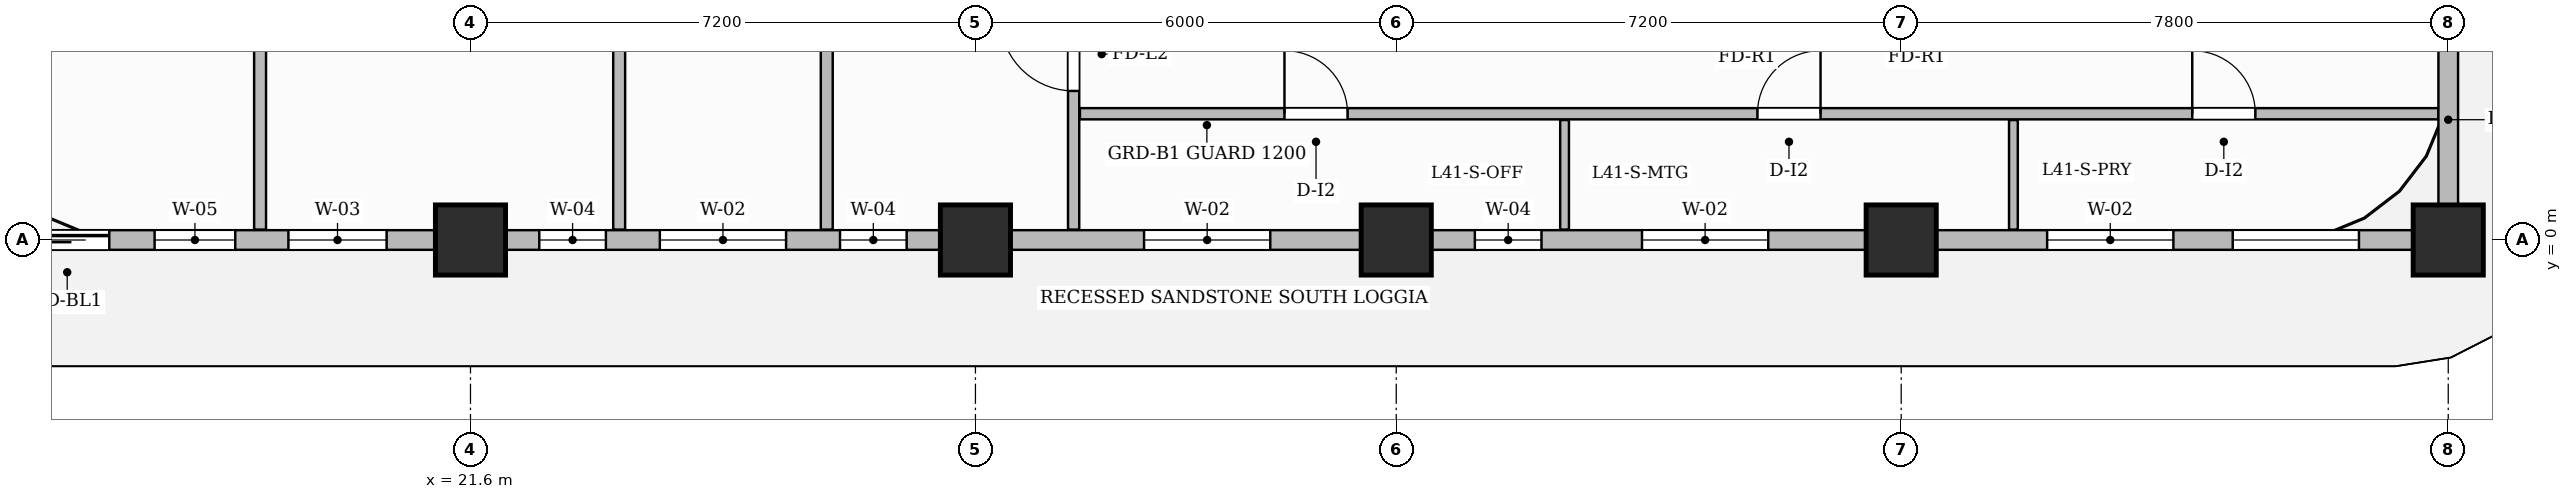
"""IFC4 building model, lengths in metres.
Left out: names, types, materials, properties, quantities, classifications, styles, units other than length and angle.
Written with IfcOpenShell. Run it as: python <this file> out.ifc"""

import sys

from ifc_helpers import new_model, si_unit, direction, frame, frame_2d, origin, origin_2d, place, context, subcontext, project, spatial, rectangle, extrude, source, transform, mapped, element, fill, save


model = new_model("IFC4")
c1 = context("Model", 3, precision=1e-05, world=origin(), true_north=direction((0.0, 1.0)))
c2 = subcontext(c1, "Body", "Model", "MODEL_VIEW")
j1 = project(units=[si_unit("LENGTHUNIT", "METRE"), si_unit("PLANEANGLEUNIT", "RADIAN")], contexts=[c1])
p1 = place(None, origin())
s1 = spatial("IfcSite", under=j1, at=p1, CompositionType="ELEMENT")
p2 = place(p1, origin())
s2 = spatial("IfcBuilding", under=s1, at=p2, CompositionType="ELEMENT")
p3 = place(p2, frame((0.0, 0.0, 165.7)))
s3 = spatial("IfcBuildingStorey", under=s2, at=p3, CompositionType="ELEMENT", Elevation=165.7)
m1 = source(origin(), c2, "Body", "SweptSolid", [
    extrude(rectangle(XDim=1.0, YDim=1.0, at=origin_2d()), origin(), (0.0, 0.0, 1.0), 3.85),
])
for number, where, z_axis, x_axis in (
    (1, (21.6, 0.0, 0.0), (0.0, 0.0, 1.0), (1.0, 0.0, 0.0)),
    (2, (28.8, 0.0, 0.0), (0.0, 0.0, 1.0), (1.0, 0.0, 0.0)),
    (3, (34.8, 0.0, 0.0), (0.0, 0.0, 1.0), (1.0, 0.0, 0.0)),
    (4, (42.0, 0.0, 0.0), (0.0, 0.0, 1.0), (1.0, 0.0, 0.0)),
    (5, (49.8, 0.0, 0.0), (0.0, 0.0, 1.0), (1.0, 0.0, 0.0)),
):
    element("IfcColumn", number, at=place(p3, frame(where, z_axis=z_axis, x_axis=x_axis)), inside=s3, PredefinedType="COLUMN", context=c2, shape_type="MappedRepresentation", body=[
        mapped(m1, transform((0.0, 0.0, 0.0), scale=1.0)),
    ])
p4 = place(p3, frame((30.2, 0.148, 0.0), z_axis=(0.0, 0.0, 1.0), x_axis=(0.0, 1.0, 0.0)))
e6 = element("IfcWall", 6, at=p4, inside=s3, PredefinedType="PARTITIONING", context=c2, shape_type="SweptSolid", body=[
    extrude(rectangle(XDim=8.912, YDim=0.16, at=frame_2d((4.456, 0.0))), origin(), (0.0, 0.0, 1.0), 3.6),
])
p5 = place(p4, frame((1.977, 0.0, 0.0)))
e7 = element("IfcOpeningElement", 7, at=p5, cuts=e6, PredefinedType="OPENING", context=c2, shape_type="SweptSolid", body=[
    extrude(rectangle(XDim=1.05, YDim=2.15, at=frame_2d((0.525, 1.075))), frame((0.0, 0.09, 0.0), z_axis=(0.0, -1.0, 0.0), x_axis=(1.0, 0.0, 0.0)), (0.0, 0.0, 1.0), 0.18),
])
p6 = place(p3, frame((30.29, 1.8, 0.0), z_axis=(0.0, 0.0, 1.0), x_axis=(1.0, 0.0, 0.0)))
e8 = element("IfcWall", 8, at=p6, inside=s3, PredefinedType="PARTITIONING", context=c2, shape_type="SweptSolid", body=[
    extrude(rectangle(XDim=19.37, YDim=0.16, at=frame_2d((9.685, 0.0))), origin(), (0.0, 0.0, 1.0), 3.6),
])
p7 = place(p6, frame((2.916, 0.0, 0.0)))
e9 = element("IfcOpeningElement", 9, at=p7, cuts=e8, PredefinedType="OPENING", context=c2, shape_type="SweptSolid", body=[
    extrude(rectangle(XDim=0.9, YDim=2.15, at=frame_2d((0.45, 1.075))), frame((0.0, 0.09, 0.0), z_axis=(0.0, -1.0, 0.0), x_axis=(1.0, 0.0, 0.0)), (0.0, 0.0, 1.0), 0.18),
])
p8 = place(p6, frame((9.66, 0.0, 0.0)))
e10 = element("IfcOpeningElement", 10, at=p8, cuts=e8, PredefinedType="OPENING", context=c2, shape_type="SweptSolid", body=[
    extrude(rectangle(XDim=0.9, YDim=2.15, at=frame_2d((0.45, 1.075))), frame((0.0, 0.09, 0.0), z_axis=(0.0, -1.0, 0.0), x_axis=(1.0, 0.0, 0.0)), (0.0, 0.0, 1.0), 0.18),
])
p9 = place(p6, frame((15.86, 0.0, 0.0)))
e11 = element("IfcOpeningElement", 11, at=p9, cuts=e8, PredefinedType="OPENING", context=c2, shape_type="SweptSolid", body=[
    extrude(rectangle(XDim=0.9, YDim=2.15, at=frame_2d((0.45, 1.075))), frame((0.0, 0.09, 0.0), z_axis=(0.0, -1.0, 0.0), x_axis=(1.0, 0.0, 0.0)), (0.0, 0.0, 1.0), 0.18),
])
for number, where, z_axis, x_axis in (
    (12, (37.2, 0.148, 0.0), (0.0, 0.0, 1.0), (0.0, 1.0, 0.0)),
    (13, (43.6, 0.148, 0.0), (0.0, 0.0, 1.0), (0.0, 1.0, 0.0)),
):
    element("IfcWall", number, at=place(p3, frame(where, z_axis=z_axis, x_axis=x_axis)), inside=s3, PredefinedType="PARTITIONING", context=c2, shape_type="SweptSolid", body=[
        extrude(rectangle(XDim=1.562, YDim=0.125, at=frame_2d((0.781, 0.0))), origin(), (0.0, 0.0, 1.0), 3.6),
    ])
for number, where, z_axis, x_axis in (
    (14, (18.6, 0.148, 0.0), (0.0, 0.0, 1.0), (0.0, 1.0, 0.0)),
    (15, (23.72, 0.148, 0.0), (0.0, 0.0, 1.0), (0.0, 1.0, 0.0)),
    (16, (26.68, 0.148, 0.0), (0.0, 0.0, 1.0), (0.0, 1.0, 0.0)),
):
    element("IfcWall", number, at=place(p3, frame(where, z_axis=z_axis, x_axis=x_axis)), inside=s3, PredefinedType="PARTITIONING", context=c2, shape_type="SweptSolid", body=[
        extrude(rectangle(XDim=8.912, YDim=0.17, at=frame_2d((4.456, 0.0))), origin(), (0.0, 0.0, 1.0), 3.6),
    ])
p10 = place(p3, frame((14.4, 0.0, 0.0), z_axis=(0.0, 0.0, 1.0), x_axis=(1.0, 0.0, 0.0)))
e17 = element("IfcWall", 17, at=p10, inside=s3, PredefinedType="SOLIDWALL", context=c2, shape_type="SweptSolid", body=[
    extrude(rectangle(XDim=35.4, YDim=0.28, at=frame_2d((17.7, 0.0))), origin(), (0.0, 0.0, 1.0), 3.085),
])
p11 = place(p10, frame((0.85, 0.0, 0.0)))
e18 = element("IfcOpeningElement", 18, at=p11, cuts=e17, PredefinedType="OPENING", context=c2, shape_type="SweptSolid", body=[
    extrude(rectangle(XDim=1.2, YDim=2.2, at=frame_2d((0.6, 1.1))), frame((0.0, 0.15, 0.0), z_axis=(0.0, -1.0, 0.0), x_axis=(1.0, 0.0, 0.0)), (0.0, 0.0, 1.0), 0.3),
])
p12 = place(p10, frame((2.696, 0.0, 0.8)))
e19 = element("IfcOpeningElement", 19, at=p12, cuts=e17, PredefinedType="OPENING", context=c2, shape_type="SweptSolid", body=[
    extrude(rectangle(XDim=1.15, YDim=1.8, at=frame_2d((0.575, 0.9))), frame((0.0, 0.15, 0.0), z_axis=(0.0, -1.0, 0.0), x_axis=(1.0, 0.0, 0.0)), (0.0, 0.0, 1.0), 0.3),
])
p13 = place(p10, frame((4.604, 0.0, 0.8)))
e20 = element("IfcOpeningElement", 20, at=p13, cuts=e17, PredefinedType="OPENING", context=c2, shape_type="SweptSolid", body=[
    extrude(rectangle(XDim=1.4, YDim=1.85, at=frame_2d((0.7, 0.925))), frame((0.0, 0.15, 0.0), z_axis=(0.0, -1.0, 0.0), x_axis=(1.0, 0.0, 0.0)), (0.0, 0.0, 1.0), 0.3),
])
p14 = place(p10, frame((8.181, 0.0, 0.8)))
e21 = element("IfcOpeningElement", 21, at=p14, cuts=e17, PredefinedType="OPENING", context=c2, shape_type="SweptSolid", body=[
    extrude(rectangle(XDim=0.95, YDim=1.75, at=frame_2d((0.475, 0.875))), frame((0.0, 0.15, 0.0), z_axis=(0.0, -1.0, 0.0), x_axis=(1.0, 0.0, 0.0)), (0.0, 0.0, 1.0), 0.3),
])
p15 = place(p10, frame((9.9, 0.0, 0.8)))
e22 = element("IfcOpeningElement", 22, at=p15, cuts=e17, PredefinedType="OPENING", context=c2, shape_type="SweptSolid", body=[
    extrude(rectangle(XDim=1.8, YDim=1.85, at=frame_2d((0.9, 0.925))), frame((0.0, 0.15, 0.0), z_axis=(0.0, -1.0, 0.0), x_axis=(1.0, 0.0, 0.0)), (0.0, 0.0, 1.0), 0.3),
])
p16 = place(p10, frame((12.469, 0.0, 0.8)))
e23 = element("IfcOpeningElement", 23, at=p16, cuts=e17, PredefinedType="OPENING", context=c2, shape_type="SweptSolid", body=[
    extrude(rectangle(XDim=0.95, YDim=1.75, at=frame_2d((0.475, 0.875))), frame((0.0, 0.15, 0.0), z_axis=(0.0, -1.0, 0.0), x_axis=(1.0, 0.0, 0.0)), (0.0, 0.0, 1.0), 0.3),
])
p17 = place(p10, frame((16.804, 0.0, 0.8)))
e24 = element("IfcOpeningElement", 24, at=p17, cuts=e17, PredefinedType="OPENING", context=c2, shape_type="SweptSolid", body=[
    extrude(rectangle(XDim=1.8, YDim=1.85, at=frame_2d((0.9, 0.925))), frame((0.0, 0.15, 0.0), z_axis=(0.0, -1.0, 0.0), x_axis=(1.0, 0.0, 0.0)), (0.0, 0.0, 1.0), 0.3),
])
p18 = place(p10, frame((21.521, 0.0, 0.8)))
e25 = element("IfcOpeningElement", 25, at=p18, cuts=e17, PredefinedType="OPENING", context=c2, shape_type="SweptSolid", body=[
    extrude(rectangle(XDim=0.95, YDim=1.75, at=frame_2d((0.475, 0.875))), frame((0.0, 0.15, 0.0), z_axis=(0.0, -1.0, 0.0), x_axis=(1.0, 0.0, 0.0)), (0.0, 0.0, 1.0), 0.3),
])
p19 = place(p10, frame((23.904, 0.0, 0.8)))
e26 = element("IfcOpeningElement", 26, at=p19, cuts=e17, PredefinedType="OPENING", context=c2, shape_type="SweptSolid", body=[
    extrude(rectangle(XDim=1.8, YDim=1.85, at=frame_2d((0.9, 0.925))), frame((0.0, 0.15, 0.0), z_axis=(0.0, -1.0, 0.0), x_axis=(1.0, 0.0, 0.0)), (0.0, 0.0, 1.0), 0.3),
])
p20 = place(p10, frame((29.681, 0.0, 0.8)))
e27 = element("IfcOpeningElement", 27, at=p20, cuts=e17, PredefinedType="OPENING", context=c2, shape_type="SweptSolid", body=[
    extrude(rectangle(XDim=1.8, YDim=1.85, at=frame_2d((0.9, 0.925))), frame((0.0, 0.15, 0.0), z_axis=(0.0, -1.0, 0.0), x_axis=(1.0, 0.0, 0.0)), (0.0, 0.0, 1.0), 0.3),
])
p21 = place(p10, frame((32.327, 0.0, 0.8)))
e28 = element("IfcOpeningElement", 28, at=p21, cuts=e17, PredefinedType="OPENING", context=c2, shape_type="SweptSolid", body=[
    extrude(rectangle(XDim=1.8, YDim=1.85, at=frame_2d((0.9, 0.925))), frame((0.0, 0.15, 0.0), z_axis=(0.0, -1.0, 0.0), x_axis=(1.0, 0.0, 0.0)), (0.0, 0.0, 1.0), 0.3),
])
p22 = place(p3, frame((49.8, 0.05, 0.0), z_axis=(0.0, 0.0, 1.0), x_axis=(0.0, 1.0, 0.0)))
e29 = element("IfcWall", 29, at=p22, inside=s3, PredefinedType="SOLIDWALL", context=c2, shape_type="SweptSolid", body=[
    extrude(rectangle(XDim=3.33, YDim=0.28, at=frame_2d((1.665, 0.0))), origin(), (0.0, 0.0, 1.0), 3.6),
])
m2 = source(origin(), c2, "Body", "SweptSolid", [
    extrude(rectangle(XDim=1.05, YDim=2.15, at=frame_2d((0.525, 1.075))), frame((0.0, 0.025, 0.0), z_axis=(0.0, -1.0, 0.0), x_axis=(1.0, 0.0, 0.0)), (0.0, 0.0, 1.0), 0.05),
])
p23 = place(p5, origin())
e30 = element("IfcDoor", 30, at=p23, inside=s3, OperationType="SINGLE_SWING_RIGHT", PredefinedType="DOOR", context=c2, shape_type="MappedRepresentation", body=[
    mapped(m2, transform((0.0, 0.0, 0.0), scale=1.0)),
])
fill(e7, e30)
m3 = source(origin(), c2, "Body", "SweptSolid", [
    extrude(rectangle(XDim=0.9, YDim=2.15, at=frame_2d((0.45, 1.075))), frame((0.0, 0.025, 0.0), z_axis=(0.0, -1.0, 0.0), x_axis=(1.0, 0.0, 0.0)), (0.0, 0.0, 1.0), 0.05),
])
p24 = place(p7, origin())
e31 = element("IfcDoor", 31, at=p24, inside=s3, OperationType="SINGLE_SWING_LEFT", PredefinedType="DOOR", context=c2, shape_type="MappedRepresentation", body=[
    mapped(m3, transform((0.0, 0.0, 0.0), scale=1.0)),
])
fill(e9, e31)
p25 = place(p8, origin())
e32 = element("IfcDoor", 32, at=p25, inside=s3, OperationType="SINGLE_SWING_RIGHT", PredefinedType="DOOR", context=c2, shape_type="MappedRepresentation", body=[
    mapped(m3, transform((0.0, 0.0, 0.0), scale=1.0)),
])
fill(e10, e32)
p26 = place(p9, origin())
e33 = element("IfcDoor", 33, at=p26, inside=s3, OperationType="SINGLE_SWING_LEFT", PredefinedType="DOOR", context=c2, shape_type="MappedRepresentation", body=[
    mapped(m3, transform((0.0, 0.0, 0.0), scale=1.0)),
])
fill(e11, e33)
m4 = source(origin(), c2, "Body", "SweptSolid", [
    extrude(rectangle(XDim=1.2, YDim=2.2, at=frame_2d((0.6, 1.1))), frame((0.0, 0.025, 0.0), z_axis=(0.0, -1.0, 0.0), x_axis=(1.0, 0.0, 0.0)), (0.0, 0.0, 1.0), 0.05),
])
p27 = place(p11, origin())
e34 = element("IfcDoor", 34, at=p27, inside=s3, OperationType="SLIDING_TO_LEFT", PredefinedType="DOOR", context=c2, shape_type="MappedRepresentation", body=[
    mapped(m4, transform((0.0, 0.0, 0.0), scale=1.0)),
])
fill(e18, e34)
m5 = source(origin(), c2, "Body", "SweptSolid", [
    extrude(rectangle(XDim=1.15, YDim=1.8, at=frame_2d((0.575, 0.9))), frame((0.0, 0.03, 0.0), z_axis=(0.0, -1.0, 0.0), x_axis=(1.0, 0.0, 0.0)), (0.0, 0.0, 1.0), 0.06),
])
p28 = place(p12, origin())
e35 = element("IfcWindow", 35, at=p28, inside=s3, PartitioningType="SINGLE_PANEL", PredefinedType="WINDOW", context=c2, shape_type="MappedRepresentation", body=[
    mapped(m5, transform((0.0, 0.0, 0.0), scale=1.0)),
])
fill(e19, e35)
m6 = source(origin(), c2, "Body", "SweptSolid", [
    extrude(rectangle(XDim=1.4, YDim=1.85, at=frame_2d((0.7, 0.925))), frame((0.0, 0.03, 0.0), z_axis=(0.0, -1.0, 0.0), x_axis=(1.0, 0.0, 0.0)), (0.0, 0.0, 1.0), 0.06),
])
p29 = place(p13, origin())
e36 = element("IfcWindow", 36, at=p29, inside=s3, PartitioningType="SINGLE_PANEL", PredefinedType="WINDOW", context=c2, shape_type="MappedRepresentation", body=[
    mapped(m6, transform((0.0, 0.0, 0.0), scale=1.0)),
])
fill(e20, e36)
m7 = source(origin(), c2, "Body", "SweptSolid", [
    extrude(rectangle(XDim=0.95, YDim=1.75, at=frame_2d((0.475, 0.875))), frame((0.0, 0.03, 0.0), z_axis=(0.0, -1.0, 0.0), x_axis=(1.0, 0.0, 0.0)), (0.0, 0.0, 1.0), 0.06),
])
p30 = place(p14, origin())
e37 = element("IfcWindow", 37, at=p30, inside=s3, PartitioningType="SINGLE_PANEL", PredefinedType="WINDOW", context=c2, shape_type="MappedRepresentation", body=[
    mapped(m7, transform((0.0, 0.0, 0.0), scale=1.0)),
])
fill(e21, e37)
m8 = source(origin(), c2, "Body", "SweptSolid", [
    extrude(rectangle(XDim=1.8, YDim=1.85, at=frame_2d((0.9, 0.925))), frame((0.0, 0.03, 0.0), z_axis=(0.0, -1.0, 0.0), x_axis=(1.0, 0.0, 0.0)), (0.0, 0.0, 1.0), 0.06),
])
p31 = place(p15, origin())
e38 = element("IfcWindow", 38, at=p31, inside=s3, PartitioningType="DOUBLE_PANEL_VERTICAL", PredefinedType="WINDOW", context=c2, shape_type="MappedRepresentation", body=[
    mapped(m8, transform((0.0, 0.0, 0.0), scale=1.0)),
])
fill(e22, e38)
p32 = place(p16, origin())
e39 = element("IfcWindow", 39, at=p32, inside=s3, PartitioningType="SINGLE_PANEL", PredefinedType="WINDOW", context=c2, shape_type="MappedRepresentation", body=[
    mapped(m7, transform((0.0, 0.0, 0.0), scale=1.0)),
])
fill(e23, e39)
p33 = place(p17, origin())
e40 = element("IfcWindow", 40, at=p33, inside=s3, PartitioningType="DOUBLE_PANEL_VERTICAL", PredefinedType="WINDOW", context=c2, shape_type="MappedRepresentation", body=[
    mapped(m8, transform((0.0, 0.0, 0.0), scale=1.0)),
])
fill(e24, e40)
p34 = place(p18, origin())
e41 = element("IfcWindow", 41, at=p34, inside=s3, PartitioningType="SINGLE_PANEL", PredefinedType="WINDOW", context=c2, shape_type="MappedRepresentation", body=[
    mapped(m7, transform((0.0, 0.0, 0.0), scale=1.0)),
])
fill(e25, e41)
p35 = place(p19, origin())
e42 = element("IfcWindow", 42, at=p35, inside=s3, PartitioningType="DOUBLE_PANEL_VERTICAL", PredefinedType="WINDOW", context=c2, shape_type="MappedRepresentation", body=[
    mapped(m8, transform((0.0, 0.0, 0.0), scale=1.0)),
])
fill(e26, e42)
p36 = place(p20, origin())
e43 = element("IfcWindow", 43, at=p36, inside=s3, PartitioningType="DOUBLE_PANEL_VERTICAL", PredefinedType="WINDOW", context=c2, shape_type="MappedRepresentation", body=[
    mapped(m8, transform((0.0, 0.0, 0.0), scale=1.0)),
])
fill(e27, e43)
p37 = place(p21, origin())
e44 = element("IfcWindow", 44, at=p37, inside=s3, PartitioningType="DOUBLE_PANEL_VERTICAL", PredefinedType="WINDOW", context=c2, shape_type="MappedRepresentation", body=[
    mapped(m8, transform((0.0, 0.0, 0.0), scale=1.0)),
])
fill(e28, e44)
save(model, sys.argv[1])
